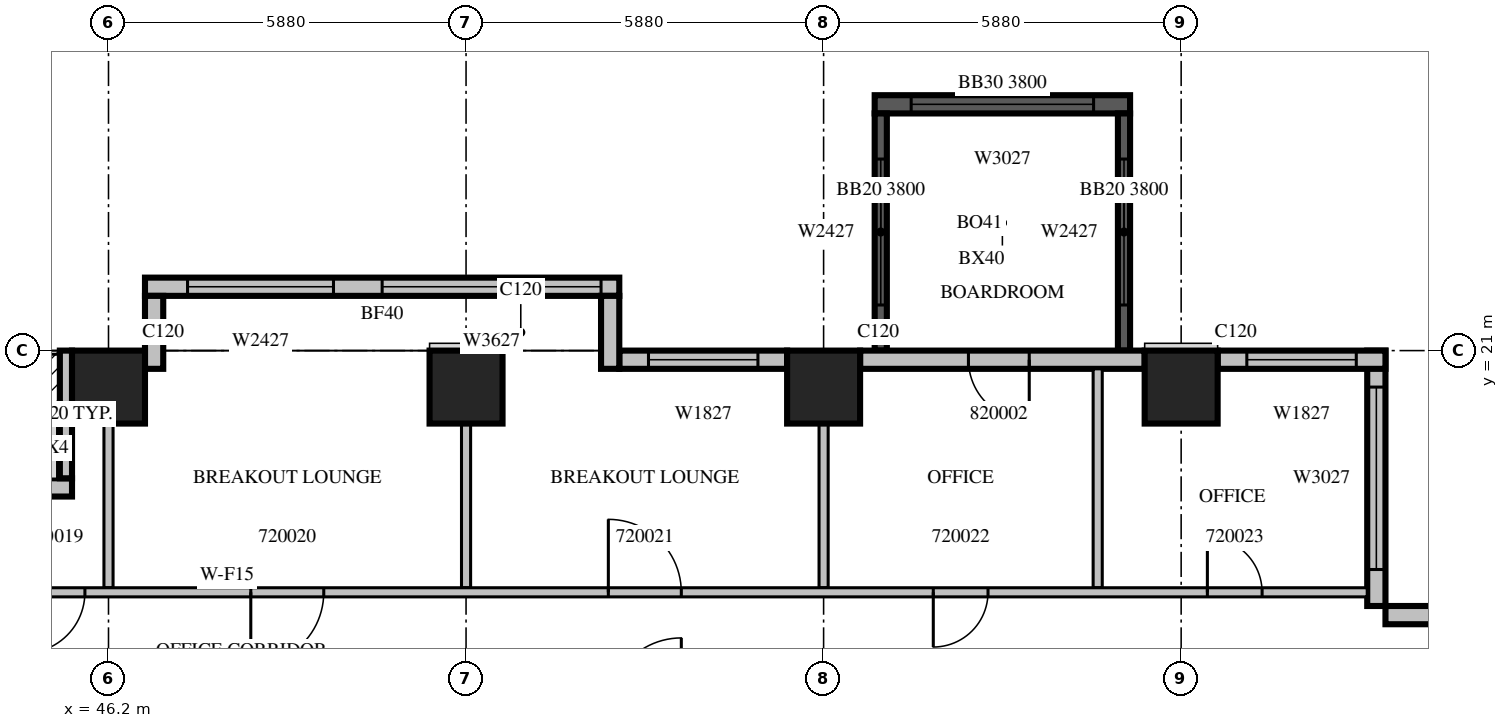
"""IFC4 building model, lengths in metres.
Left out: names, types, materials, properties, quantities, classifications, styles, units other than length and angle.
Written with IfcOpenShell. Run it as: python <this file> out.ifc"""

import sys

from ifc_helpers import new_model, si_unit, direction, frame, frame_2d, origin, origin_2d, place, context, subcontext, project, spatial, rectangle, extrude, source, transform, mapped, element, fill, save


model = new_model("IFC4")
c1 = context("Model", 3, precision=1e-05, world=origin(), true_north=direction((0.0, 1.0)))
c2 = subcontext(c1, "Body", "Model", "MODEL_VIEW")
j1 = project(units=[si_unit("LENGTHUNIT", "METRE"), si_unit("PLANEANGLEUNIT", "RADIAN")], contexts=[c1])
p1 = place(None, origin())
s1 = spatial("IfcSite", under=j1, at=p1, CompositionType="ELEMENT")
p2 = place(p1, origin())
s2 = spatial("IfcBuilding", under=s1, at=p2, CompositionType="ELEMENT")
p3 = place(p2, frame((0.0, 0.0, 95.1)))
s3 = spatial("IfcBuildingStorey", under=s2, at=p3, CompositionType="ELEMENT", Elevation=95.1)
m1 = source(origin(), c2, "Body", "SweptSolid", [
    extrude(rectangle(XDim=1.2, YDim=1.2, at=origin_2d()), origin(), (0.0, 0.0, 1.0), 4.2),
])
for number, where, z_axis, x_axis in (
    (1, (46.2, 20.4, 0.0), (0.0, 0.0, 1.0), (1.0, 0.0, 0.0)),
    (2, (52.08, 20.4, 0.0), (0.0, 0.0, 1.0), (1.0, 0.0, 0.0)),
    (3, (57.96, 20.4, 0.0), (0.0, 0.0, 1.0), (1.0, 0.0, 0.0)),
    (4, (63.84, 20.4, 0.0), (0.0, 0.0, 1.0), (1.0, 0.0, 0.0)),
):
    element("IfcColumn", number, at=place(p3, frame(where, z_axis=z_axis, x_axis=x_axis)), inside=s3, PredefinedType="COLUMN", context=c2, shape_type="MappedRepresentation", body=[
        mapped(m1, transform((0.0, 0.0, 0.0), scale=1.0)),
    ])
m2 = source(origin(), c2, "Body", "SweptSolid", [
    extrude(rectangle(XDim=4.2, YDim=0.3, at=frame_2d((2.1, 0.0))), origin(), (0.0, 0.0, 1.0), 3.8),
])
p4 = place(p3, frame((63.0, 25.05, 0.0), z_axis=(0.0, 0.0, 1.0), x_axis=(-1.0, 0.0, 0.0)))
e5 = element("IfcWall", 5, at=p4, inside=s3, PredefinedType="SOLIDWALL", context=c2, shape_type="MappedRepresentation", body=[
    mapped(m2, transform((0.0, 0.0, 0.0), scale=1.0)),
])
m3 = source(origin(), c2, "Body", "SweptSolid", [
    extrude(rectangle(XDim=3.0, YDim=2.7, at=frame_2d((1.5, 1.35))), frame((0.0, 0.16, 0.0), z_axis=(0.0, -1.0, 0.0), x_axis=(1.0, 0.0, 0.0)), (0.0, 0.0, 1.0), 0.32),
])
p5 = place(p4, frame((0.6, 0.0, 0.6)))
e6 = element("IfcOpeningElement", 6, at=p5, cuts=e5, PredefinedType="OPENING", context=c2, shape_type="MappedRepresentation", body=[
    mapped(m3, transform((0.0, 0.0, 0.0), scale=1.0)),
])
m4 = source(origin(), c2, "Body", "SweptSolid", [
    extrude(rectangle(XDim=3.9, YDim=0.2, at=frame_2d((1.95, 0.0))), origin(), (0.0, 0.0, 1.0), 3.8),
])
p6 = place(p3, frame((62.9, 21.0, 0.0), z_axis=(0.0, 0.0, 1.0), x_axis=(0.0, 1.0, 0.0)))
e7 = element("IfcWall", 7, at=p6, inside=s3, PredefinedType="SOLIDWALL", context=c2, shape_type="MappedRepresentation", body=[
    mapped(m4, transform((0.0, 0.0, 0.0), scale=1.0)),
])
m5 = source(origin(), c2, "Body", "SweptSolid", [
    extrude(rectangle(XDim=2.4, YDim=2.7, at=frame_2d((1.2, 1.35))), frame((0.0, 0.11, 0.0), z_axis=(0.0, -1.0, 0.0), x_axis=(1.0, 0.0, 0.0)), (0.0, 0.0, 1.0), 0.22),
])
p7 = place(p6, frame((0.75, 0.0, 0.6)))
e8 = element("IfcOpeningElement", 8, at=p7, cuts=e7, PredefinedType="OPENING", context=c2, shape_type="MappedRepresentation", body=[
    mapped(m5, transform((0.0, 0.0, 0.0), scale=1.0)),
])
p8 = place(p3, frame((58.9, 21.0, 0.0), z_axis=(0.0, 0.0, 1.0), x_axis=(0.0, 1.0, 0.0)))
e9 = element("IfcWall", 9, at=p8, inside=s3, PredefinedType="SOLIDWALL", context=c2, shape_type="MappedRepresentation", body=[
    mapped(m4, transform((0.0, 0.0, 0.0), scale=1.0)),
])
p9 = place(p8, frame((0.75, 0.0, 0.6)))
e10 = element("IfcOpeningElement", 10, at=p9, cuts=e9, PredefinedType="OPENING", context=c2, shape_type="MappedRepresentation", body=[
    mapped(m5, transform((0.0, 0.0, 0.0), scale=1.0)),
])
m6 = source(origin(), c2, "Body", "SweptSolid", [
    extrude(rectangle(XDim=4.2, YDim=0.3, at=frame_2d((2.1, 0.0))), origin(), (0.0, 0.0, 1.0), 3.8),
])
p10 = place(p3, frame((71.4, 16.65, 0.0), z_axis=(0.0, 0.0, 1.0), x_axis=(-1.0, 0.0, 0.0)))
e11 = element("IfcWall", 11, at=p10, inside=s3, PredefinedType="STANDARD", context=c2, shape_type="MappedRepresentation", body=[
    mapped(m6, transform((0.0, 0.0, 0.0), scale=1.0)),
])
m7 = source(origin(), c2, "Body", "SweptSolid", [
    extrude(rectangle(XDim=1.2, YDim=2.7, at=frame_2d((0.6, 1.35))), frame((0.0, 0.16, 0.0), z_axis=(0.0, -1.0, 0.0), x_axis=(1.0, 0.0, 0.0)), (0.0, 0.0, 1.0), 0.32),
])
p11 = place(p10, frame((0.66, 0.0, 0.6)))
e12 = element("IfcOpeningElement", 12, at=p11, cuts=e11, PredefinedType="OPENING", context=c2, shape_type="MappedRepresentation", body=[
    mapped(m7, transform((0.0, 0.0, 0.0), scale=1.0)),
])
p12 = place(p3, frame((67.05, 16.8, 0.0), z_axis=(0.0, 0.0, 1.0), x_axis=(0.0, 1.0, 0.0)))
e13 = element("IfcWall", 13, at=p12, inside=s3, PredefinedType="STANDARD", context=c2, shape_type="MappedRepresentation", body=[
    mapped(m6, transform((0.0, 0.0, 0.0), scale=1.0)),
])
p13 = place(p12, frame((0.6, 0.0, 0.6)))
e14 = element("IfcOpeningElement", 14, at=p13, cuts=e13, PredefinedType="OPENING", context=c2, shape_type="MappedRepresentation", body=[
    mapped(m3, transform((0.0, 0.0, 0.0), scale=1.0)),
])
m8 = source(origin(), c2, "Body", "SweptSolid", [
    extrude(rectangle(XDim=2.76, YDim=0.3, at=frame_2d((1.38, 0.0))), origin(), (0.0, 0.0, 1.0), 3.8),
])
p14 = place(p3, frame((67.2, 20.85, 0.0), z_axis=(0.0, 0.0, 1.0), x_axis=(-1.0, 0.0, 0.0)))
e15 = element("IfcWall", 15, at=p14, inside=s3, PredefinedType="STANDARD", context=c2, shape_type="MappedRepresentation", body=[
    mapped(m8, transform((0.0, 0.0, 0.0), scale=1.0)),
])
m9 = source(origin(), c2, "Body", "SweptSolid", [
    extrude(rectangle(XDim=1.8, YDim=2.7, at=frame_2d((0.9, 1.35))), frame((0.0, 0.16, 0.0), z_axis=(0.0, -1.0, 0.0), x_axis=(1.0, 0.0, 0.0)), (0.0, 0.0, 1.0), 0.32),
])
p15 = place(p14, frame((0.48, 0.0, 0.6)))
e16 = element("IfcOpeningElement", 16, at=p15, cuts=e15, PredefinedType="OPENING", context=c2, shape_type="MappedRepresentation", body=[
    mapped(m9, transform((0.0, 0.0, 0.0), scale=1.0)),
])
m10 = source(origin(), c2, "Body", "SweptSolid", [
    extrude(rectangle(XDim=4.68, YDim=0.3, at=frame_2d((2.34, 0.0))), origin(), (0.0, 0.0, 1.0), 3.8),
])
p16 = place(p3, frame((63.24, 20.85, 0.0), z_axis=(0.0, 0.0, 1.0), x_axis=(-1.0, 0.0, 0.0)))
e17 = element("IfcWall", 17, at=p16, inside=s3, PredefinedType="STANDARD", context=c2, shape_type="MappedRepresentation", body=[
    mapped(m10, transform((0.0, 0.0, 0.0), scale=1.0)),
])
m11 = source(origin(), c2, "Body", "SweptSolid", [
    extrude(rectangle(XDim=1.0, YDim=2.1, at=frame_2d((0.5, 1.05))), frame((0.0, 0.16, 0.0), z_axis=(0.0, -1.0, 0.0), x_axis=(1.0, 0.0, 0.0)), (0.0, 0.0, 1.0), 0.32),
])
p17 = place(p16, frame((1.898, 0.0, 0.0)))
e18 = element("IfcOpeningElement", 18, at=p17, cuts=e17, PredefinedType="OPENING", context=c2, shape_type="MappedRepresentation", body=[
    mapped(m11, transform((0.0, 0.0, 0.0), scale=1.0)),
])
p18 = place(p3, frame((57.36, 20.85, 0.0), z_axis=(0.0, 0.0, 1.0), x_axis=(-1.0, 0.0, 0.0)))
e19 = element("IfcWall", 19, at=p18, inside=s3, PredefinedType="STANDARD", context=c2, shape_type="MappedRepresentation", body=[
    mapped(m8, transform((0.0, 0.0, 0.0), scale=1.0)),
])
p19 = place(p18, frame((0.48, 0.0, 0.6)))
e20 = element("IfcOpeningElement", 20, at=p19, cuts=e19, PredefinedType="OPENING", context=c2, shape_type="MappedRepresentation", body=[
    mapped(m9, transform((0.0, 0.0, 0.0), scale=1.0)),
])
m12 = source(origin(), c2, "Body", "SweptSolid", [
    extrude(rectangle(XDim=7.8, YDim=0.3, at=frame_2d((3.9, 0.0))), origin(), (0.0, 0.0, 1.0), 3.8),
])
p20 = place(p3, frame((54.6, 22.05, 0.0), z_axis=(0.0, 0.0, 1.0), x_axis=(-1.0, 0.0, 0.0)))
e21 = element("IfcWall", 21, at=p20, inside=s3, PredefinedType="STANDARD", context=c2, shape_type="MappedRepresentation", body=[
    mapped(m12, transform((0.0, 0.0, 0.0), scale=1.0)),
])
m13 = source(origin(), c2, "Body", "SweptSolid", [
    extrude(rectangle(XDim=3.6, YDim=2.7, at=frame_2d((1.8, 1.35))), frame((0.0, 0.16, 0.0), z_axis=(0.0, -1.0, 0.0), x_axis=(1.0, 0.0, 0.0)), (0.0, 0.0, 1.0), 0.32),
])
p21 = place(p20, frame((0.3, 0.0, 0.6)))
e22 = element("IfcOpeningElement", 22, at=p21, cuts=e21, PredefinedType="OPENING", context=c2, shape_type="MappedRepresentation", body=[
    mapped(m13, transform((0.0, 0.0, 0.0), scale=1.0)),
])
m14 = source(origin(), c2, "Body", "SweptSolid", [
    extrude(rectangle(XDim=2.4, YDim=2.7, at=frame_2d((1.2, 1.35))), frame((0.0, 0.16, 0.0), z_axis=(0.0, -1.0, 0.0), x_axis=(1.0, 0.0, 0.0)), (0.0, 0.0, 1.0), 0.32),
])
p22 = place(p20, frame((4.7, 0.0, 0.6)))
e23 = element("IfcOpeningElement", 23, at=p22, cuts=e21, PredefinedType="OPENING", context=c2, shape_type="MappedRepresentation", body=[
    mapped(m14, transform((0.0, 0.0, 0.0), scale=1.0)),
])
m15 = source(origin(), c2, "Body", "SweptSolid", [
    extrude(rectangle(XDim=1.2, YDim=0.3, at=frame_2d((0.6, 0.0))), origin(), (0.0, 0.0, 1.0), 3.8),
])
for number, where, z_axis, x_axis in (
    (24, (54.45, 20.7, 0.0), (0.0, 0.0, 1.0), (0.0, 1.0, 0.0)),
    (25, (46.95, 20.7, 0.0), (0.0, 0.0, 1.0), (0.0, 1.0, 0.0)),
):
    element("IfcWall", number, at=place(p3, frame(where, z_axis=z_axis, x_axis=x_axis)), inside=s3, PredefinedType="STANDARD", context=c2, shape_type="MappedRepresentation", body=[
        mapped(m15, transform((0.0, 0.0, 0.0), scale=1.0)),
    ])
m16 = source(origin(), c2, "Body", "SweptSolid", [
    extrude(rectangle(XDim=3.6, YDim=0.3, at=frame_2d((1.8, 0.0))), origin(), (0.0, 0.0, 1.0), 3.8),
])
p23 = place(p3, frame((45.6, 18.75, 0.0), z_axis=(0.0, 0.0, 1.0), x_axis=(-1.0, 0.0, 0.0)))
e26 = element("IfcWall", 26, at=p23, inside=s3, PredefinedType="STANDARD", context=c2, shape_type="MappedRepresentation", body=[
    mapped(m16, transform((0.0, 0.0, 0.0), scale=1.0)),
])
m17 = source(origin(), c2, "Body", "SweptSolid", [
    extrude(rectangle(XDim=1.8, YDim=2.4, at=frame_2d((0.9, 1.2))), frame((0.0, 0.16, 0.0), z_axis=(0.0, -1.0, 0.0), x_axis=(1.0, 0.0, 0.0)), (0.0, 0.0, 1.0), 0.32),
])
p24 = place(p23, frame((1.5, 0.0, 0.0)))
e27 = element("IfcOpeningElement", 27, at=p24, cuts=e26, PredefinedType="OPENING", context=c2, shape_type="MappedRepresentation", body=[
    mapped(m17, transform((0.0, 0.0, 0.0), scale=1.0)),
])
m18 = source(origin(), c2, "Body", "SweptSolid", [
    extrude(rectangle(XDim=2.1, YDim=0.2, at=frame_2d((1.05, 0.0))), origin(), (0.0, 0.0, 1.0), 3.8),
])
p25 = place(p3, frame((45.5, 21.0, 0.0), z_axis=(0.0, 0.0, 1.0), x_axis=(0.0, -1.0, 0.0)))
e28 = element("IfcWall", 28, at=p25, inside=s3, PredefinedType="STANDARD", context=c2, shape_type="MappedRepresentation", body=[
    mapped(m18, transform((0.0, 0.0, 0.0), scale=1.0)),
])
m19 = source(origin(), c2, "Body", "SweptSolid", [
    extrude(rectangle(XDim=2.701, YDim=0.15, at=frame_2d((1.351, 0.0))), origin(), (0.0, 0.0, 1.0), 3.8),
])
p26 = place(p3, frame((52.08, 19.801, 0.0), z_axis=(0.0, 0.0, 1.0), x_axis=(0.0, -1.0, 0.0)))
e29 = element("IfcWall", 29, at=p26, inside=s3, PredefinedType="PARTITIONING", context=c2, shape_type="MappedRepresentation", body=[
    mapped(m19, transform((0.0, 0.0, 0.0), scale=1.0)),
])
m20 = source(origin(), c2, "Body", "SweptSolid", [
    extrude(rectangle(XDim=3.6, YDim=0.15, at=frame_2d((1.8, 0.0))), origin(), (0.0, 0.0, 1.0), 3.8),
])
p27 = place(p3, frame((62.468, 20.7, 0.0), z_axis=(0.0, 0.0, 1.0), x_axis=(0.0, -1.0, 0.0)))
e30 = element("IfcWall", 30, at=p27, inside=s3, PredefinedType="PARTITIONING", context=c2, shape_type="MappedRepresentation", body=[
    mapped(m20, transform((0.0, 0.0, 0.0), scale=1.0)),
])
for number, where, z_axis, x_axis in (
    (31, (46.2, 17.1, 0.0), (0.0, 0.0, 1.0), (0.0, 1.0, 0.0)),
    (32, (57.96, 17.1, 0.0), (0.0, 0.0, 1.0), (0.0, 1.0, 0.0)),
):
    element("IfcWall", number, at=place(p3, frame(where, z_axis=z_axis, x_axis=x_axis)), inside=s3, PredefinedType="PARTITIONING", context=c2, shape_type="MappedRepresentation", body=[
        mapped(m19, transform((0.0, 0.0, 0.0), scale=1.0)),
    ])
m21 = source(origin(), c2, "Body", "SweptSolid", [
    extrude(rectangle(XDim=37.5, YDim=0.15, at=frame_2d((18.75, 0.0))), origin(), (0.0, 0.0, 1.0), 3.8),
])
p28 = place(p3, frame((29.4, 17.025, 0.0), z_axis=(0.0, 0.0, 1.0), x_axis=(1.0, 0.0, 0.0)))
e33 = element("IfcWall", 33, at=p28, inside=s3, PredefinedType="PARTITIONING", context=c2, shape_type="MappedRepresentation", body=[
    mapped(m21, transform((0.0, 0.0, 0.0), scale=1.0)),
])
m22 = source(origin(), c2, "Body", "SweptSolid", [
    extrude(rectangle(XDim=1.0, YDim=2.1, at=frame_2d((0.5, 1.05))), frame((0.0, 0.085, 0.0), z_axis=(0.0, -1.0, 0.0), x_axis=(1.0, 0.0, 0.0)), (0.0, 0.0, 1.0), 0.17),
])
p29 = place(p28, frame((1.357, 0.0, 0.0)))
e34 = element("IfcOpeningElement", 34, at=p29, cuts=e33, PredefinedType="OPENING", context=c2, shape_type="MappedRepresentation", body=[
    mapped(m22, transform((0.0, 0.0, 0.0), scale=1.0)),
])
p30 = place(p28, frame((4.669, 0.0, 0.0)))
e35 = element("IfcOpeningElement", 35, at=p30, cuts=e33, PredefinedType="OPENING", context=c2, shape_type="MappedRepresentation", body=[
    mapped(m22, transform((0.0, 0.0, 0.0), scale=1.0)),
])
p31 = place(p28, frame((7.012, 0.0, 0.0)))
e36 = element("IfcOpeningElement", 36, at=p31, cuts=e33, PredefinedType="OPENING", context=c2, shape_type="MappedRepresentation", body=[
    mapped(m22, transform((0.0, 0.0, 0.0), scale=1.0)),
])
p32 = place(p28, frame((9.757, 0.0, 0.0)))
e37 = element("IfcOpeningElement", 37, at=p32, cuts=e33, PredefinedType="OPENING", context=c2, shape_type="MappedRepresentation", body=[
    mapped(m22, transform((0.0, 0.0, 0.0), scale=1.0)),
])
p33 = place(p28, frame((13.069, 0.0, 0.0)))
e38 = element("IfcOpeningElement", 38, at=p33, cuts=e33, PredefinedType="OPENING", context=c2, shape_type="MappedRepresentation", body=[
    mapped(m22, transform((0.0, 0.0, 0.0), scale=1.0)),
])
p34 = place(p28, frame((15.412, 0.0, 0.0)))
e39 = element("IfcOpeningElement", 39, at=p34, cuts=e33, PredefinedType="OPENING", context=c2, shape_type="MappedRepresentation", body=[
    mapped(m22, transform((0.0, 0.0, 0.0), scale=1.0)),
])
m23 = source(origin(), c2, "Body", "SweptSolid", [
    extrude(rectangle(XDim=1.2, YDim=2.1, at=frame_2d((0.6, 1.05))), frame((0.0, 0.085, 0.0), z_axis=(0.0, -1.0, 0.0), x_axis=(1.0, 0.0, 0.0)), (0.0, 0.0, 1.0), 0.17),
])
p35 = place(p28, frame((19.14, 0.0, 0.0)))
e40 = element("IfcOpeningElement", 40, at=p35, cuts=e33, PredefinedType="OPENING", context=c2, shape_type="MappedRepresentation", body=[
    mapped(m23, transform((0.0, 0.0, 0.0), scale=1.0)),
])
p36 = place(p28, frame((25.02, 0.0, 0.0)))
e41 = element("IfcOpeningElement", 41, at=p36, cuts=e33, PredefinedType="OPENING", context=c2, shape_type="MappedRepresentation", body=[
    mapped(m23, transform((0.0, 0.0, 0.0), scale=1.0)),
])
m24 = source(origin(), c2, "Body", "SweptSolid", [
    extrude(rectangle(XDim=0.9, YDim=2.1, at=frame_2d((0.45, 1.05))), frame((0.0, 0.085, 0.0), z_axis=(0.0, -1.0, 0.0), x_axis=(1.0, 0.0, 0.0)), (0.0, 0.0, 1.0), 0.17),
])
p37 = place(p28, frame((30.364, 0.0, 0.0)))
e42 = element("IfcOpeningElement", 42, at=p37, cuts=e33, PredefinedType="OPENING", context=c2, shape_type="MappedRepresentation", body=[
    mapped(m24, transform((0.0, 0.0, 0.0), scale=1.0)),
])
p38 = place(p28, frame((34.871, 0.0, 0.0)))
e43 = element("IfcOpeningElement", 43, at=p38, cuts=e33, PredefinedType="OPENING", context=c2, shape_type="MappedRepresentation", body=[
    mapped(m24, transform((0.0, 0.0, 0.0), scale=1.0)),
])
m25 = source(origin(), c2, "Body", "SweptSolid", [
    extrude(rectangle(XDim=3.0, YDim=2.7, at=frame_2d((1.5, 1.35))), frame((0.0, 0.03, 0.0), z_axis=(0.0, -1.0, 0.0), x_axis=(1.0, 0.0, 0.0)), (0.0, 0.0, 1.0), 0.06),
])
p39 = place(p5, origin())
e44 = element("IfcWindow", 44, at=p39, inside=s3, PartitioningType="SINGLE_PANEL", PredefinedType="WINDOW", context=c2, shape_type="MappedRepresentation", body=[
    mapped(m25, transform((0.0, 0.0, 0.0), scale=1.0)),
])
fill(e6, e44)
m26 = source(origin(), c2, "Body", "SweptSolid", [
    extrude(rectangle(XDim=2.4, YDim=2.7, at=frame_2d((1.2, 1.35))), frame((0.0, 0.03, 0.0), z_axis=(0.0, -1.0, 0.0), x_axis=(1.0, 0.0, 0.0)), (0.0, 0.0, 1.0), 0.06),
])
p40 = place(p7, origin())
e45 = element("IfcWindow", 45, at=p40, inside=s3, PartitioningType="SINGLE_PANEL", PredefinedType="WINDOW", context=c2, shape_type="MappedRepresentation", body=[
    mapped(m26, transform((0.0, 0.0, 0.0), scale=1.0)),
])
fill(e8, e45)
p41 = place(p9, origin())
e46 = element("IfcWindow", 46, at=p41, inside=s3, PartitioningType="SINGLE_PANEL", PredefinedType="WINDOW", context=c2, shape_type="MappedRepresentation", body=[
    mapped(m26, transform((0.0, 0.0, 0.0), scale=1.0)),
])
fill(e10, e46)
p42 = place(p13, origin())
e47 = element("IfcWindow", 47, at=p42, inside=s3, PartitioningType="SINGLE_PANEL", PredefinedType="WINDOW", context=c2, shape_type="MappedRepresentation", body=[
    mapped(m25, transform((0.0, 0.0, 0.0), scale=1.0)),
])
fill(e14, e47)
m27 = source(origin(), c2, "Body", "SweptSolid", [
    extrude(rectangle(XDim=1.8, YDim=2.7, at=frame_2d((0.9, 1.35))), frame((0.0, 0.03, 0.0), z_axis=(0.0, -1.0, 0.0), x_axis=(1.0, 0.0, 0.0)), (0.0, 0.0, 1.0), 0.06),
])
p43 = place(p15, origin())
e48 = element("IfcWindow", 48, at=p43, inside=s3, PartitioningType="SINGLE_PANEL", PredefinedType="WINDOW", context=c2, shape_type="MappedRepresentation", body=[
    mapped(m27, transform((0.0, 0.0, 0.0), scale=1.0)),
])
fill(e16, e48)
p44 = place(p19, origin())
e49 = element("IfcWindow", 49, at=p44, inside=s3, PartitioningType="SINGLE_PANEL", PredefinedType="WINDOW", context=c2, shape_type="MappedRepresentation", body=[
    mapped(m27, transform((0.0, 0.0, 0.0), scale=1.0)),
])
fill(e20, e49)
m28 = source(origin(), c2, "Body", "SweptSolid", [
    extrude(rectangle(XDim=3.6, YDim=2.7, at=frame_2d((1.8, 1.35))), frame((0.0, 0.03, 0.0), z_axis=(0.0, -1.0, 0.0), x_axis=(1.0, 0.0, 0.0)), (0.0, 0.0, 1.0), 0.06),
])
p45 = place(p21, origin())
e50 = element("IfcWindow", 50, at=p45, inside=s3, PartitioningType="SINGLE_PANEL", PredefinedType="WINDOW", context=c2, shape_type="MappedRepresentation", body=[
    mapped(m28, transform((0.0, 0.0, 0.0), scale=1.0)),
])
fill(e22, e50)
p46 = place(p22, origin())
e51 = element("IfcWindow", 51, at=p46, inside=s3, PartitioningType="SINGLE_PANEL", PredefinedType="WINDOW", context=c2, shape_type="MappedRepresentation", body=[
    mapped(m26, transform((0.0, 0.0, 0.0), scale=1.0)),
])
fill(e23, e51)
m29 = source(origin(), c2, "Body", "SweptSolid", [
    extrude(rectangle(XDim=1.0, YDim=2.1, at=frame_2d((0.5, 1.05))), frame((0.0, 0.025, 0.0), z_axis=(0.0, -1.0, 0.0), x_axis=(1.0, 0.0, 0.0)), (0.0, 0.0, 1.0), 0.05),
])
p47 = place(p34, origin())
e52 = element("IfcDoor", 52, at=p47, inside=s3, OperationType="SINGLE_SWING_RIGHT", PredefinedType="DOOR", context=c2, shape_type="MappedRepresentation", body=[
    mapped(m29, transform((0.0, 0.0, 0.0), scale=1.0)),
])
fill(e39, e52)
m30 = source(origin(), c2, "Body", "SweptSolid", [
    extrude(rectangle(XDim=1.2, YDim=2.1, at=frame_2d((0.6, 1.05))), frame((0.0, 0.025, 0.0), z_axis=(0.0, -1.0, 0.0), x_axis=(1.0, 0.0, 0.0)), (0.0, 0.0, 1.0), 0.05),
])
p48 = place(p35, origin())
e53 = element("IfcDoor", 53, at=p48, inside=s3, OperationType="SINGLE_SWING_RIGHT", PredefinedType="DOOR", context=c2, shape_type="MappedRepresentation", body=[
    mapped(m30, transform((0.0, 0.0, 0.0), scale=1.0)),
])
fill(e40, e53)
p49 = place(p36, origin())
e54 = element("IfcDoor", 54, at=p49, inside=s3, OperationType="SINGLE_SWING_LEFT", PredefinedType="DOOR", context=c2, shape_type="MappedRepresentation", body=[
    mapped(m30, transform((0.0, 0.0, 0.0), scale=1.0)),
])
fill(e41, e54)
m31 = source(origin(), c2, "Body", "SweptSolid", [
    extrude(rectangle(XDim=0.9, YDim=2.1, at=frame_2d((0.45, 1.05))), frame((0.0, 0.025, 0.0), z_axis=(0.0, -1.0, 0.0), x_axis=(1.0, 0.0, 0.0)), (0.0, 0.0, 1.0), 0.05),
])
p50 = place(p37, origin())
e55 = element("IfcDoor", 55, at=p50, inside=s3, OperationType="SINGLE_SWING_RIGHT", PredefinedType="DOOR", context=c2, shape_type="MappedRepresentation", body=[
    mapped(m31, transform((0.0, 0.0, 0.0), scale=1.0)),
])
fill(e42, e55)
p51 = place(p38, origin())
e56 = element("IfcDoor", 56, at=p51, inside=s3, OperationType="SINGLE_SWING_LEFT", PredefinedType="DOOR", context=c2, shape_type="MappedRepresentation", body=[
    mapped(m31, transform((0.0, 0.0, 0.0), scale=1.0)),
])
fill(e43, e56)
p52 = place(p17, origin())
e57 = element("IfcDoor", 57, at=p52, inside=s3, OperationType="SINGLE_SWING_LEFT", PredefinedType="DOOR", context=c2, shape_type="MappedRepresentation", body=[
    mapped(m29, transform((0.0, 0.0, 0.0), scale=1.0)),
])
fill(e18, e57)
save(model, sys.argv[1])
